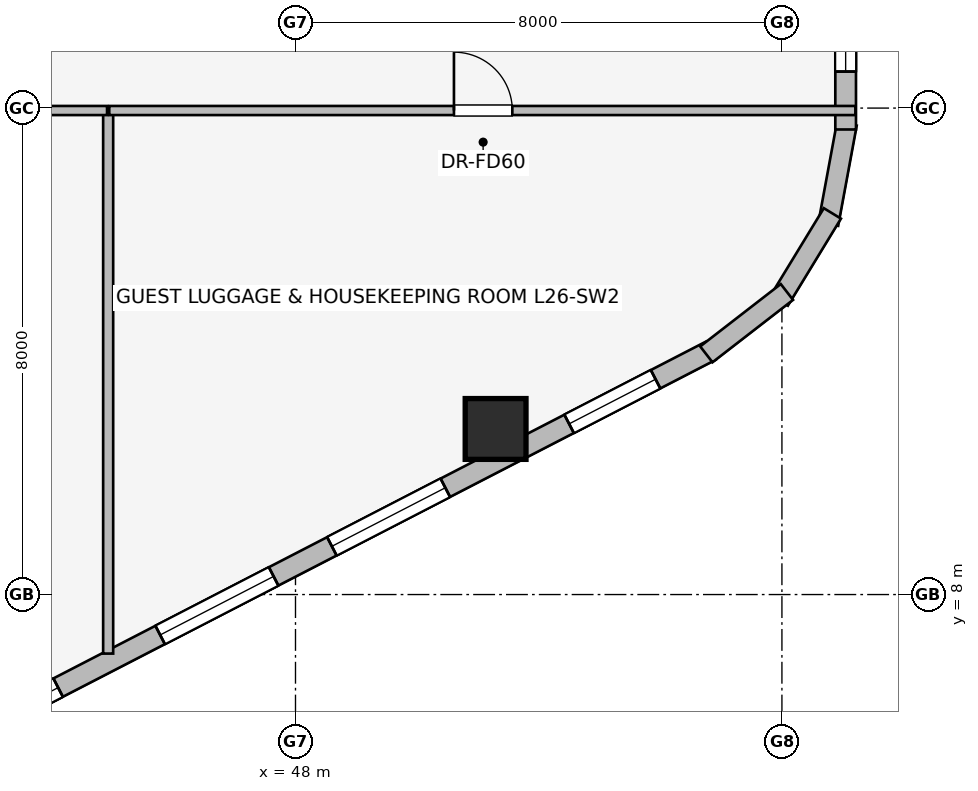
"""IFC4 building model, lengths in metres.
Left out: names, types, materials, properties, quantities, classifications, styles, units other than length and angle.
Written with IfcOpenShell. Run it as: python <this file> out.ifc"""

import sys

from ifc_helpers import new_model, si_unit, direction, frame, frame_2d, origin, origin_2d, place, context, subcontext, project, spatial, rectangle, extrude, element, fill, save


model = new_model("IFC4")
c1 = context("Model", 3, precision=1e-05, world=origin(), true_north=direction((0.0, 1.0)))
c2 = subcontext(c1, "Body", "Model", "MODEL_VIEW")
j1 = project(units=[si_unit("LENGTHUNIT", "METRE"), si_unit("PLANEANGLEUNIT", "RADIAN")], contexts=[c1])
p1 = place(None, origin())
s1 = spatial("IfcSite", under=j1, at=p1, CompositionType="ELEMENT")
p2 = place(p1, origin())
s2 = spatial("IfcBuilding", under=s1, at=p2, CompositionType="ELEMENT")
p3 = place(p2, frame((0.0, 0.0, 101.55)))
s3 = spatial("IfcBuildingStorey", under=s2, at=p3, CompositionType="ELEMENT", Elevation=101.55)
p4 = place(p3, frame((51.291, 10.723, 0.0), z_axis=(0.0, 0.0, 1.0), x_axis=(1.0, 0.0, 0.0)))
e1 = element("IfcColumn", 1, at=p4, inside=s3, PredefinedType="COLUMN", context=c2, shape_type="SweptSolid", body=[
    extrude(rectangle(XDim=1.0, YDim=1.0, at=origin_2d()), origin(), (0.0, 0.0, 1.0), 3.45),
])
p5 = place(p3, frame((54.831, 12.01, 0.0), z_axis=(0.0, 0.0, 1.0), x_axis=(-0.888613612362, -0.458656568606, 0.0)))
e2 = element("IfcWall", 2, at=p5, inside=s3, PredefinedType="STANDARD", context=c2, shape_type="SweptSolid", body=[
    extrude(rectangle(XDim=18.681, YDim=0.34, at=frame_2d((9.34, 0.0))), origin(), (0.0, 0.0, 1.0), 3.19),
])
p6 = place(p5, frame((1.023, 0.0, 0.75)))
e3 = element("IfcOpeningElement", 3, at=p6, cuts=e2, PredefinedType="OPENING", context=c2, shape_type="SweptSolid", body=[
    extrude(rectangle(XDim=1.6, YDim=1.55, at=frame_2d((0.8, 0.775))), frame((0.0, 0.18, 0.0), z_axis=(0.0, -1.0, 0.0), x_axis=(1.0, 0.0, 0.0)), (0.0, 0.0, 1.0), 0.36),
])
p7 = place(p5, frame((4.914, 0.0, 0.75)))
e4 = element("IfcOpeningElement", 4, at=p7, cuts=e2, PredefinedType="OPENING", context=c2, shape_type="SweptSolid", body=[
    extrude(rectangle(XDim=2.1, YDim=1.5, at=frame_2d((1.05, 0.75))), frame((0.0, 0.18, 0.0), z_axis=(0.0, -1.0, 0.0), x_axis=(1.0, 0.0, 0.0)), (0.0, 0.0, 1.0), 0.36),
])
p8 = place(p5, frame((8.092, 0.0, 0.75)))
e5 = element("IfcOpeningElement", 5, at=p8, cuts=e2, PredefinedType="OPENING", context=c2, shape_type="SweptSolid", body=[
    extrude(rectangle(XDim=2.1, YDim=1.5, at=frame_2d((1.05, 0.75))), frame((0.0, 0.18, 0.0), z_axis=(0.0, -1.0, 0.0), x_axis=(1.0, 0.0, 0.0)), (0.0, 0.0, 1.0), 0.36),
])
p9 = place(p5, frame((12.08, 0.0, 0.75)))
e6 = element("IfcOpeningElement", 6, at=p9, cuts=e2, PredefinedType="OPENING", context=c2, shape_type="SweptSolid", body=[
    extrude(rectangle(XDim=1.6, YDim=1.55, at=frame_2d((0.8, 0.775))), frame((0.0, 0.18, 0.0), z_axis=(0.0, -1.0, 0.0), x_axis=(1.0, 0.0, 0.0)), (0.0, 0.0, 1.0), 0.36),
])
p10 = place(p5, frame((15.808, 0.0, 0.75)))
e7 = element("IfcOpeningElement", 7, at=p10, cuts=e2, PredefinedType="OPENING", context=c2, shape_type="SweptSolid", body=[
    extrude(rectangle(XDim=2.1, YDim=1.5, at=frame_2d((1.05, 0.75))), frame((0.0, 0.18, 0.0), z_axis=(0.0, -1.0, 0.0), x_axis=(1.0, 0.0, 0.0)), (0.0, 0.0, 1.0), 0.36),
])
p11 = place(p3, frame((57.068, 15.742, 0.0), z_axis=(0.0, 0.0, 1.0), x_axis=(-0.181984991895, -0.983301308209, 0.0)))
e8 = element("IfcWall", 8, at=p11, inside=s3, PredefinedType="STANDARD", context=c2, shape_type="SweptSolid", body=[
    extrude(rectangle(XDim=1.677, YDim=0.33, at=frame_2d((0.838, 0.0))), origin(), (0.0, 0.0, 1.0), 3.19),
])
p12 = place(p3, frame((56.83, 14.268, 0.0), z_axis=(0.0, 0.0, 1.0), x_axis=(-0.520519429557, -0.853849824883, 0.0)))
e9 = element("IfcWall", 9, at=p12, inside=s3, PredefinedType="STANDARD", context=c2, shape_type="SweptSolid", body=[
    extrude(rectangle(XDim=1.677, YDim=0.33, at=frame_2d((0.839, 0.0))), origin(), (0.0, 0.0, 1.0), 3.19),
])
p13 = place(p3, frame((56.082, 12.976, 0.0), z_axis=(0.0, 0.0, 1.0), x_axis=(-0.790621329885, -0.612305408053, 0.0)))
e10 = element("IfcWall", 10, at=p13, inside=s3, PredefinedType="STANDARD", context=c2, shape_type="SweptSolid", body=[
    extrude(rectangle(XDim=1.676, YDim=0.33, at=frame_2d((0.838, 0.0))), origin(), (0.0, 0.0, 1.0), 3.19),
])
p14 = place(p3, frame((57.048, 20.325, 0.0), z_axis=(0.0, 0.0, 1.0), x_axis=(0.0, -1.0, 0.0)))
e11 = element("IfcWall", 11, at=p14, inside=s3, PredefinedType="STANDARD", context=c2, shape_type="SweptSolid", body=[
    extrude(rectangle(XDim=4.677, YDim=0.34, at=frame_2d((2.338, 0.0))), origin(), (0.0, 0.0, 1.0), 3.19),
])
p15 = place(p14, frame((2.675, 0.0, 0.75)))
e12 = element("IfcOpeningElement", 12, at=p15, cuts=e11, PredefinedType="OPENING", context=c2, shape_type="SweptSolid", body=[
    extrude(rectangle(XDim=1.05, YDim=1.4, at=frame_2d((0.525, 0.7))), frame((0.0, 0.18, 0.0), z_axis=(0.0, -1.0, 0.0), x_axis=(1.0, 0.0, 0.0)), (0.0, 0.0, 1.0), 0.36),
])
p16 = place(p3, frame((44.919, 7.029, 0.0), z_axis=(0.0, 0.0, 1.0), x_axis=(0.0, 1.0, 0.0)))
e13 = element("IfcWall", 13, at=p16, inside=s3, PredefinedType="PARTITIONING", context=c2, shape_type="SweptSolid", body=[
    extrude(rectangle(XDim=8.901, YDim=0.165, at=frame_2d((4.45, 0.0))), origin(), (0.0, 0.0, 1.0), 3.19),
])
p17 = place(p3, frame((32.85, 15.96, 0.0), z_axis=(0.0, 0.0, 1.0), x_axis=(1.0, 0.0, 0.0)))
e14 = element("IfcWall", 14, at=p17, inside=s3, PredefinedType="PARTITIONING", context=c2, shape_type="SweptSolid", body=[
    extrude(rectangle(XDim=12.051, YDim=0.15, at=frame_2d((6.025, 0.0))), origin(), (0.0, 0.0, 1.0), 3.19),
])
p18 = place(p17, frame((5.546, 0.0, 0.0)))
e15 = element("IfcOpeningElement", 15, at=p18, cuts=e14, PredefinedType="OPENING", context=c2, shape_type="SweptSolid", body=[
    extrude(rectangle(XDim=0.96, YDim=2.0, at=frame_2d((0.48, 1.0))), frame((0.0, 0.085, 0.0), z_axis=(0.0, -1.0, 0.0), x_axis=(1.0, 0.0, 0.0)), (0.0, 0.0, 1.0), 0.17),
])
p19 = place(p3, frame((44.937, 15.96, 0.0), z_axis=(0.0, 0.0, 1.0), x_axis=(1.0, 0.0, 0.0)))
e16 = element("IfcWall", 16, at=p19, inside=s3, PredefinedType="PARTITIONING", context=c2, shape_type="SweptSolid", body=[
    extrude(rectangle(XDim=12.271, YDim=0.15, at=frame_2d((6.135, 0.0))), origin(), (0.0, 0.0, 1.0), 3.19),
])
p20 = place(p19, frame((5.669, 0.0, 0.0)))
e17 = element("IfcOpeningElement", 17, at=p20, cuts=e16, PredefinedType="OPENING", context=c2, shape_type="SweptSolid", body=[
    extrude(rectangle(XDim=0.96, YDim=2.0, at=frame_2d((0.48, 1.0))), frame((0.0, 0.085, 0.0), z_axis=(0.0, -1.0, 0.0), x_axis=(1.0, 0.0, 0.0)), (0.0, 0.0, 1.0), 0.17),
])
p21 = place(p6, origin())
e18 = element("IfcWindow", 18, at=p21, inside=s3, PartitioningType="SINGLE_PANEL", PredefinedType="WINDOW", context=c2, shape_type="SweptSolid", body=[
    extrude(rectangle(XDim=1.6, YDim=1.55, at=frame_2d((0.8, 0.775))), frame((0.0, 0.03, 0.0), z_axis=(0.0, -1.0, 0.0), x_axis=(1.0, 0.0, 0.0)), (0.0, 0.0, 1.0), 0.06),
])
fill(e3, e18)
p22 = place(p7, origin())
e19 = element("IfcWindow", 19, at=p22, inside=s3, PartitioningType="SINGLE_PANEL", PredefinedType="WINDOW", context=c2, shape_type="SweptSolid", body=[
    extrude(rectangle(XDim=2.1, YDim=1.5, at=frame_2d((1.05, 0.75))), frame((0.0, 0.03, 0.0), z_axis=(0.0, -1.0, 0.0), x_axis=(1.0, 0.0, 0.0)), (0.0, 0.0, 1.0), 0.06),
])
fill(e4, e19)
p23 = place(p8, origin())
e20 = element("IfcWindow", 20, at=p23, inside=s3, PartitioningType="SINGLE_PANEL", PredefinedType="WINDOW", context=c2, shape_type="SweptSolid", body=[
    extrude(rectangle(XDim=2.1, YDim=1.5, at=frame_2d((1.05, 0.75))), frame((0.0, 0.03, 0.0), z_axis=(0.0, -1.0, 0.0), x_axis=(1.0, 0.0, 0.0)), (0.0, 0.0, 1.0), 0.06),
])
fill(e5, e20)
p24 = place(p9, origin())
e21 = element("IfcWindow", 21, at=p24, inside=s3, PartitioningType="SINGLE_PANEL", PredefinedType="WINDOW", context=c2, shape_type="SweptSolid", body=[
    extrude(rectangle(XDim=1.6, YDim=1.55, at=frame_2d((0.8, 0.775))), frame((0.0, 0.03, 0.0), z_axis=(0.0, -1.0, 0.0), x_axis=(1.0, 0.0, 0.0)), (0.0, 0.0, 1.0), 0.06),
])
fill(e6, e21)
p25 = place(p15, origin())
e22 = element("IfcWindow", 22, at=p25, inside=s3, PartitioningType="SINGLE_PANEL", PredefinedType="WINDOW", context=c2, shape_type="SweptSolid", body=[
    extrude(rectangle(XDim=1.05, YDim=1.4, at=frame_2d((0.525, 0.7))), frame((0.0, 0.03, 0.0), z_axis=(0.0, -1.0, 0.0), x_axis=(1.0, 0.0, 0.0)), (0.0, 0.0, 1.0), 0.06),
])
fill(e12, e22)
p26 = place(p20, origin())
e23 = element("IfcDoor", 23, at=p26, inside=s3, OperationType="SINGLE_SWING_LEFT", PredefinedType="DOOR", context=c2, shape_type="SweptSolid", body=[
    extrude(rectangle(XDim=0.96, YDim=2.0, at=frame_2d((0.48, 1.0))), frame((0.0, 0.025, 0.0), z_axis=(0.0, -1.0, 0.0), x_axis=(1.0, 0.0, 0.0)), (0.0, 0.0, 1.0), 0.05),
])
fill(e17, e23)
save(model, sys.argv[1])
